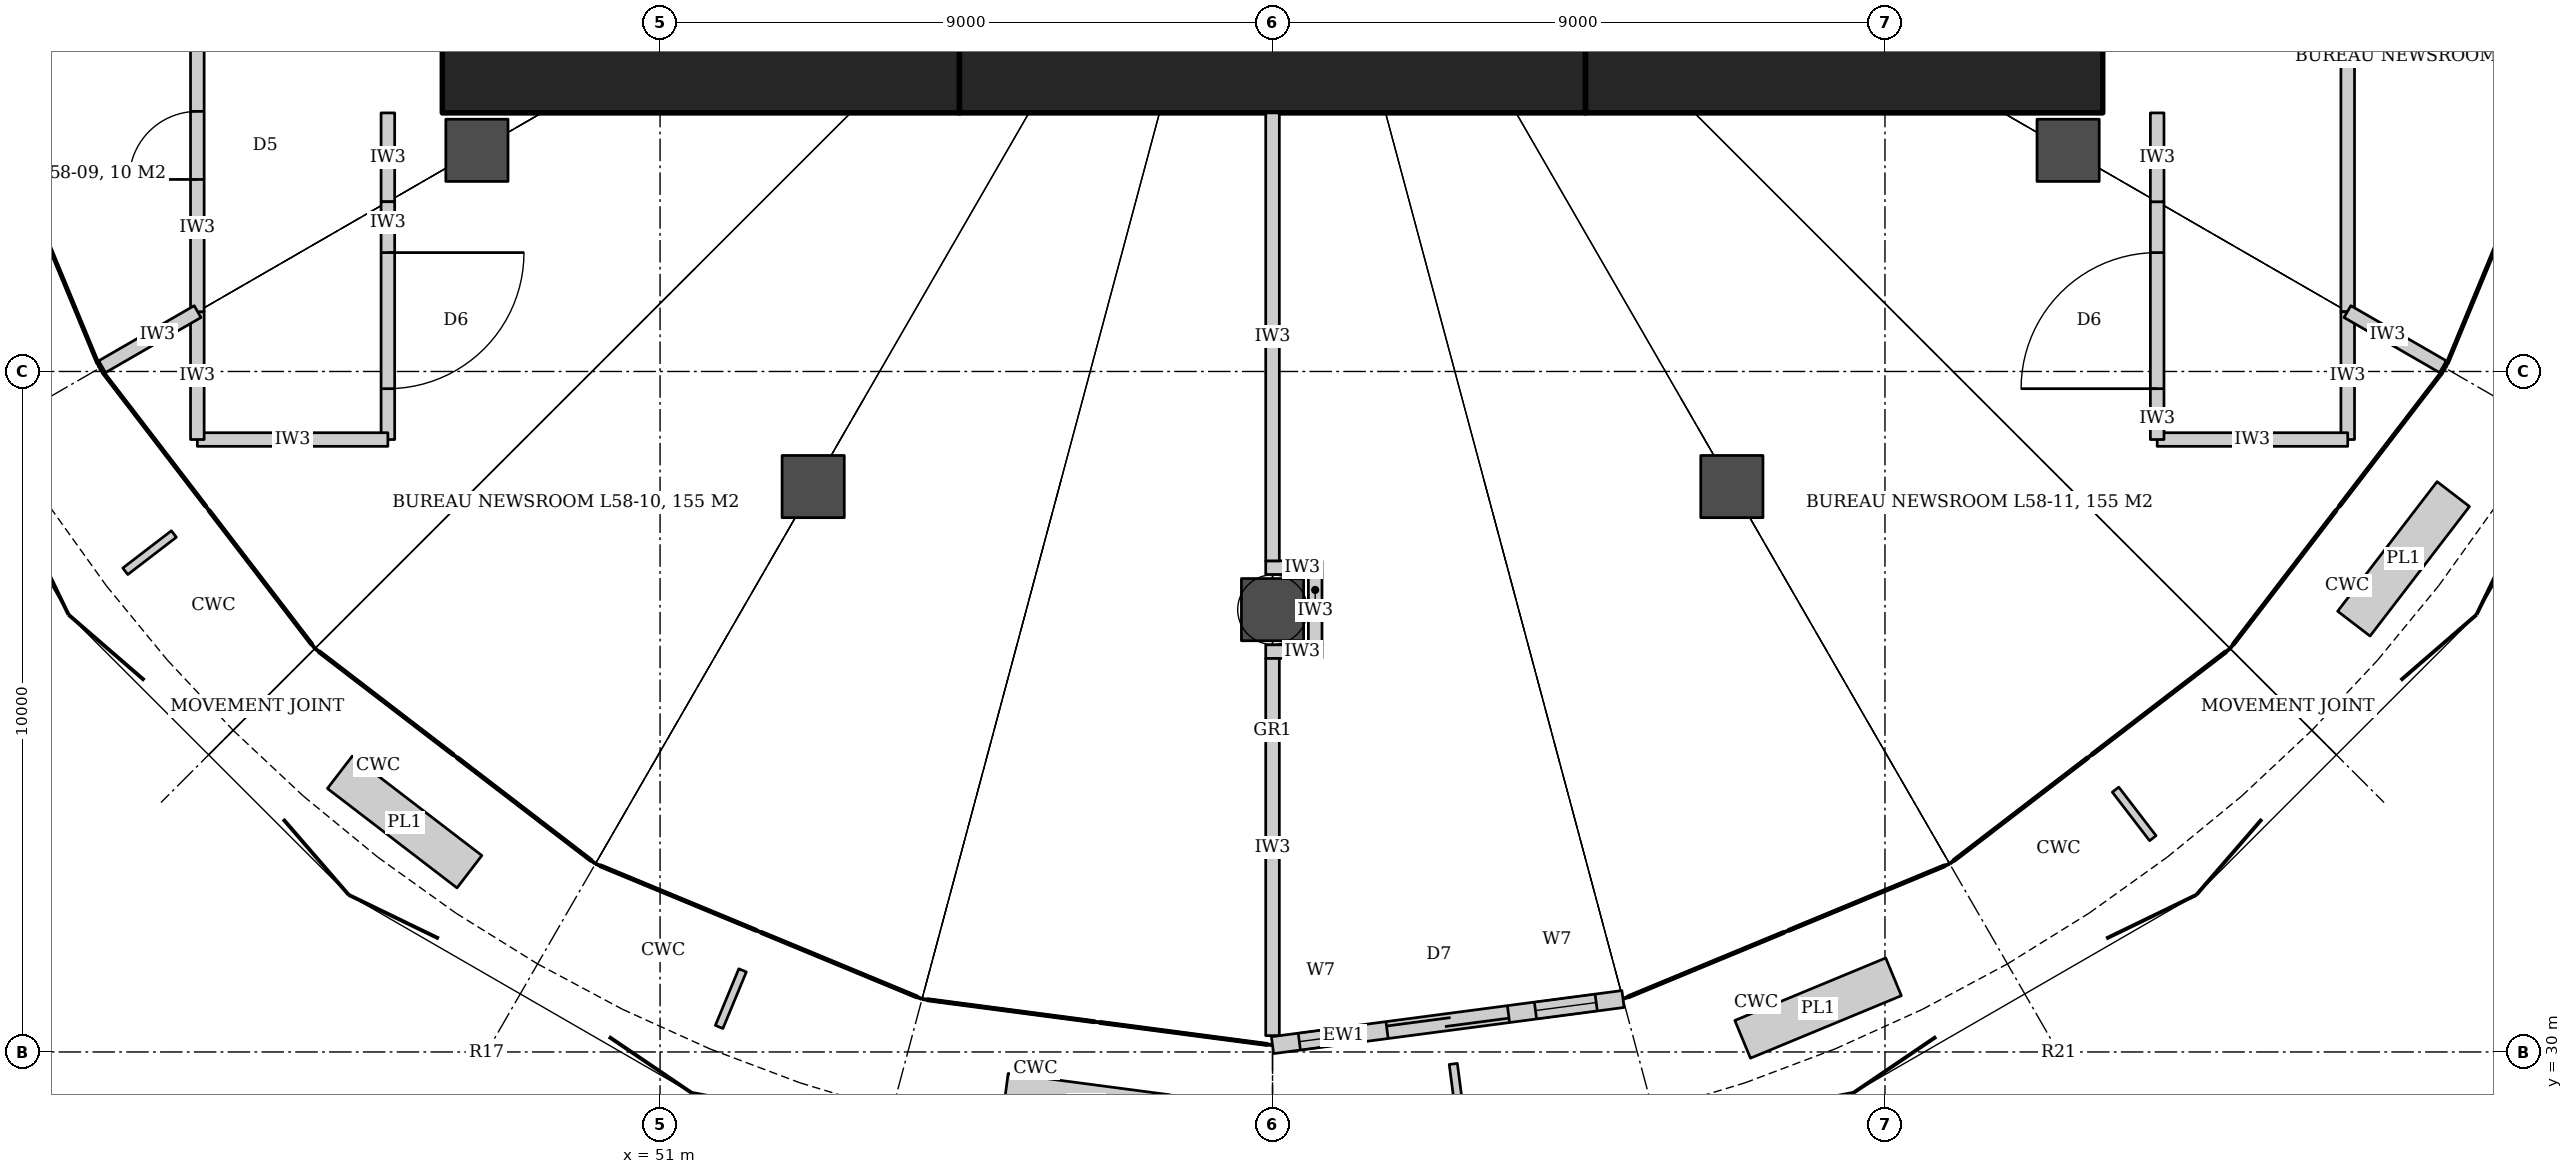
"""IFC4 building model, lengths in metres.
Left out: names, types, materials, properties, quantities, classifications, styles, units other than length and angle.
Written with IfcOpenShell. Run it as: python <this file> out.ifc"""

import sys

from ifc_helpers import new_model, si_unit, direction, frame, frame_2d, origin, origin_2d, place, context, subcontext, project, spatial, rectangle, hollow_circle, extrude, element, fill, save


model = new_model("IFC4")
c1 = context("Model", 3, precision=1e-05, world=origin(), true_north=direction((0.0, 1.0)))
c2 = subcontext(c1, "Body", "Model", "MODEL_VIEW")
j1 = project(units=[si_unit("LENGTHUNIT", "METRE"), si_unit("PLANEANGLEUNIT", "RADIAN")], contexts=[c1])
p1 = place(None, origin())
s1 = spatial("IfcSite", under=j1, at=p1, CompositionType="ELEMENT")
p2 = place(p1, origin())
s2 = spatial("IfcBuilding", under=s1, at=p2, CompositionType="ELEMENT")
p3 = place(p2, frame((0.0, 0.0, 252.8)))
s3 = spatial("IfcBuildingStorey", under=s2, at=p3, CompositionType="ELEMENT", Elevation=252.8)
p4 = place(p3, frame((47.8, 44.55, 0.0), z_axis=(0.0, 0.0, 1.0), x_axis=(1.0, 0.0, 0.0)))
e1 = element("IfcWall", 1, at=p4, inside=s3, PredefinedType="SHEAR", context=c2, shape_type="SweptSolid", body=[
    extrude(rectangle(XDim=7.6, YDim=1.5, at=frame_2d((3.8, 0.0))), origin(), (0.0, 0.0, 1.0), 4.2),
])
p5 = place(p3, frame((55.4, 44.55, 0.0), z_axis=(0.0, 0.0, 1.0), x_axis=(1.0, 0.0, 0.0)))
e2 = element("IfcWall", 2, at=p5, inside=s3, PredefinedType="SHEAR", context=c2, shape_type="SweptSolid", body=[
    extrude(rectangle(XDim=9.2, YDim=1.5, at=frame_2d((4.6, 0.0))), origin(), (0.0, 0.0, 1.0), 4.2),
])
p6 = place(p3, frame((64.6, 44.55, 0.0), z_axis=(0.0, 0.0, 1.0), x_axis=(1.0, 0.0, 0.0)))
e3 = element("IfcWall", 3, at=p6, inside=s3, PredefinedType="SHEAR", context=c2, shape_type="SweptSolid", body=[
    extrude(rectangle(XDim=7.6, YDim=1.5, at=frame_2d((3.8, 0.0))), origin(), (0.0, 0.0, 1.0), 4.2),
])
for number, where, z_axis, x_axis in (
    (4, (48.309, 43.25, 0.0), (0.0, 0.0, 1.0), (1.0, 0.0, 0.0)),
    (5, (53.25, 38.309, 0.0), (0.0, 0.0, 1.0), (1.0, 0.0, 0.0)),
    (6, (60.0, 36.5, 0.0), (0.0, 0.0, 1.0), (1.0, 0.0, 0.0)),
    (7, (66.75, 38.309, 0.0), (0.0, 0.0, 1.0), (1.0, 0.0, 0.0)),
    (8, (71.691, 43.25, 0.0), (0.0, 0.0, 1.0), (1.0, 0.0, 0.0)),
):
    element("IfcColumn", number, at=place(p3, frame(where, z_axis=z_axis, x_axis=x_axis)), inside=s3, PredefinedType="COLUMN", context=c2, shape_type="SweptSolid", body=[
        extrude(hollow_circle(Radius=0.457, WallThickness=0.045, at=origin_2d()), origin(), (0.0, 0.0, 1.0), 4.2),
    ])
p7 = place(p3, frame((75.8, 50.0, 0.0), z_axis=(0.0, 0.0, 1.0), x_axis=(0.0, -1.0, 0.0)))
e9 = element("IfcWall", 9, at=p7, inside=s3, PredefinedType="PARTITIONING", context=c2, shape_type="SweptSolid", body=[
    extrude(rectangle(XDim=9.122, YDim=0.2, at=frame_2d((4.561, 0.0))), origin(), (0.0, 0.0, 1.0), 3.02),
])
p8 = place(p7, frame((4.061, 0.0, 0.0)))
e10 = element("IfcOpeningElement", 10, at=p8, cuts=e9, PredefinedType="OPENING", context=c2, shape_type="SweptSolid", body=[
    extrude(rectangle(XDim=1.0, YDim=2.1, at=frame_2d((0.5, 1.05))), frame((0.0, 0.11, 0.0), z_axis=(0.0, -1.0, 0.0), x_axis=(1.0, 0.0, 0.0)), (0.0, 0.0, 1.0), 0.22),
])
p9 = place(p3, frame((75.8, 40.878, 0.0), z_axis=(0.0, 0.0, 1.0), x_axis=(0.0, -1.0, 0.0)))
e11 = element("IfcWall", 11, at=p9, inside=s3, PredefinedType="PARTITIONING", context=c2, shape_type="SweptSolid", body=[
    extrude(rectangle(XDim=1.878, YDim=0.2, at=frame_2d((0.939, 0.0))), origin(), (0.0, 0.0, 1.0), 3.02),
])
p10 = place(p3, frame((75.8, 39.0, 0.0), z_axis=(0.0, 0.0, 1.0), x_axis=(-1.0, 0.0, 0.0)))
e12 = element("IfcWall", 12, at=p10, inside=s3, PredefinedType="PARTITIONING", context=c2, shape_type="SweptSolid", body=[
    extrude(rectangle(XDim=2.8, YDim=0.2, at=frame_2d((1.4, 0.0))), origin(), (0.0, 0.0, 1.0), 3.04),
])
p11 = place(p3, frame((73.0, 39.0, 0.0), z_axis=(0.0, 0.0, 1.0), x_axis=(0.0, 1.0, 0.0)))
e13 = element("IfcWall", 13, at=p11, inside=s3, PredefinedType="PARTITIONING", context=c2, shape_type="SweptSolid", body=[
    extrude(rectangle(XDim=3.494, YDim=0.2, at=frame_2d((1.747, 0.0))), origin(), (0.0, 0.0, 1.0), 3.02),
])
p12 = place(p11, frame((0.747, 0.0, 0.0)))
e14 = element("IfcOpeningElement", 14, at=p12, cuts=e13, PredefinedType="OPENING", context=c2, shape_type="SweptSolid", body=[
    extrude(rectangle(XDim=2.0, YDim=2.1, at=frame_2d((1.0, 1.05))), frame((0.0, 0.11, 0.0), z_axis=(0.0, -1.0, 0.0), x_axis=(1.0, 0.0, 0.0)), (0.0, 0.0, 1.0), 0.22),
])
for number, where, z_axis, x_axis in (
    (15, (73.0, 42.494, 0.0), (0.0, 0.0, 1.0), (0.0, 1.0, 0.0)),
    (16, (47.0, 43.8, 0.0), (0.0, 0.0, 1.0), (0.0, -1.0, 0.0)),
):
    element("IfcWall", number, at=place(p3, frame(where, z_axis=z_axis, x_axis=x_axis)), inside=s3, PredefinedType="PARTITIONING", context=c2, shape_type="SweptSolid", body=[
        extrude(rectangle(XDim=1.306, YDim=0.2, at=frame_2d((0.653, 0.0))), origin(), (0.0, 0.0, 1.0), 3.02),
    ])
p13 = place(p3, frame((47.0, 42.494, 0.0), z_axis=(0.0, 0.0, 1.0), x_axis=(0.0, -1.0, 0.0)))
e17 = element("IfcWall", 17, at=p13, inside=s3, PredefinedType="PARTITIONING", context=c2, shape_type="SweptSolid", body=[
    extrude(rectangle(XDim=3.494, YDim=0.2, at=frame_2d((1.747, 0.0))), origin(), (0.0, 0.0, 1.0), 3.02),
])
p14 = place(p13, frame((0.747, 0.0, 0.0)))
e18 = element("IfcOpeningElement", 18, at=p14, cuts=e17, PredefinedType="OPENING", context=c2, shape_type="SweptSolid", body=[
    extrude(rectangle(XDim=2.0, YDim=2.1, at=frame_2d((1.0, 1.05))), frame((0.0, 0.11, 0.0), z_axis=(0.0, -1.0, 0.0), x_axis=(1.0, 0.0, 0.0)), (0.0, 0.0, 1.0), 0.22),
])
p15 = place(p3, frame((47.0, 39.0, 0.0), z_axis=(0.0, 0.0, 1.0), x_axis=(-1.0, 0.0, 0.0)))
e19 = element("IfcWall", 19, at=p15, inside=s3, PredefinedType="PARTITIONING", context=c2, shape_type="SweptSolid", body=[
    extrude(rectangle(XDim=2.8, YDim=0.2, at=frame_2d((1.4, 0.0))), origin(), (0.0, 0.0, 1.0), 3.04),
])
p16 = place(p3, frame((44.2, 39.0, 0.0), z_axis=(0.0, 0.0, 1.0), x_axis=(0.0, 1.0, 0.0)))
e20 = element("IfcWall", 20, at=p16, inside=s3, PredefinedType="PARTITIONING", context=c2, shape_type="SweptSolid", body=[
    extrude(rectangle(XDim=1.878, YDim=0.2, at=frame_2d((0.939, 0.0))), origin(), (0.0, 0.0, 1.0), 3.02),
])
p17 = place(p3, frame((44.2, 40.878, 0.0), z_axis=(0.0, 0.0, 1.0), x_axis=(0.0, 1.0, 0.0)))
e21 = element("IfcWall", 21, at=p17, inside=s3, PredefinedType="PARTITIONING", context=c2, shape_type="SweptSolid", body=[
    extrude(rectangle(XDim=4.888, YDim=0.2, at=frame_2d((2.444, 0.0))), origin(), (0.0, 0.0, 1.0), 3.02),
])
p18 = place(p17, frame((1.944, 0.0, 0.0)))
e22 = element("IfcOpeningElement", 22, at=p18, cuts=e21, PredefinedType="OPENING", context=c2, shape_type="SweptSolid", body=[
    extrude(rectangle(XDim=1.0, YDim=2.1, at=frame_2d((0.5, 1.05))), frame((0.0, 0.11, 0.0), z_axis=(0.0, -1.0, 0.0), x_axis=(1.0, 0.0, 0.0)), (0.0, 0.0, 1.0), 0.22),
])
p19 = place(p3, frame((44.204, 40.88, 0.0), z_axis=(0.0, 0.0, 1.0), x_axis=(-0.866055074793, -0.499948604784, 0.0)))
e23 = element("IfcWall", 23, at=p19, inside=s3, PredefinedType="PARTITIONING", context=c2, shape_type="SweptSolid", body=[
    extrude(rectangle(XDim=1.62, YDim=0.2, at=frame_2d((0.81, 0.0))), origin(), (0.0, 0.0, 1.0), 3.02),
])
for number, where, z_axis, x_axis in (
    (24, (59.9, 37.117, 0.0), (0.0, 0.0, 1.0), (1.0, 0.0, 0.0)),
    (25, (59.9, 35.883, 0.0), (0.0, 0.0, 1.0), (1.0, 0.0, 0.0)),
):
    element("IfcWall", number, at=place(p3, frame(where, z_axis=z_axis, x_axis=x_axis)), inside=s3, PredefinedType="PARTITIONING", context=c2, shape_type="SweptSolid", body=[
        extrude(rectangle(XDim=0.827, YDim=0.2, at=frame_2d((0.414, 0.0))), origin(), (0.0, 0.0, 1.0), 3.02),
    ])
p20 = place(p3, frame((60.627, 37.017, 0.0), z_axis=(0.0, 0.0, 1.0), x_axis=(0.0, -1.0, 0.0)))
e26 = element("IfcWall", 26, at=p20, inside=s3, PredefinedType="PARTITIONING", context=c2, shape_type="SweptSolid", body=[
    extrude(rectangle(XDim=1.034, YDim=0.2, at=frame_2d((0.517, 0.0))), origin(), (0.0, 0.0, 1.0), 3.02),
])
p21 = place(p3, frame((60.0, 43.8, 0.0), z_axis=(0.0, 0.0, 1.0), x_axis=(0.0, -1.0, 0.0)))
e27 = element("IfcWall", 27, at=p21, inside=s3, PredefinedType="PARTITIONING", context=c2, shape_type="SweptSolid", body=[
    extrude(rectangle(XDim=6.583, YDim=0.2, at=frame_2d((3.292, 0.0))), origin(), (0.0, 0.0, 1.0), 3.04),
])
p22 = place(p3, frame((60.0, 35.783, 0.0), z_axis=(0.0, 0.0, 1.0), x_axis=(0.0, -1.0, 0.0)))
e28 = element("IfcWall", 28, at=p22, inside=s3, PredefinedType="PARTITIONING", context=c2, shape_type="SweptSolid", body=[
    extrude(rectangle(XDim=5.543, YDim=0.2, at=frame_2d((2.771, 0.0))), origin(), (0.0, 0.0, 1.0), 3.02),
])
p23 = place(p3, frame((75.796, 40.88, 0.0), z_axis=(0.0, 0.0, 1.0), x_axis=(0.866055074793, -0.499948604784, 0.0)))
e29 = element("IfcWall", 29, at=p23, inside=s3, PredefinedType="PARTITIONING", context=c2, shape_type="SweptSolid", body=[
    extrude(rectangle(XDim=1.62, YDim=0.2, at=frame_2d((0.81, 0.0))), origin(), (0.0, 0.0, 1.0), 3.02),
])
p24 = place(p3, frame((60.0, 30.1, 0.0), z_axis=(0.0, 0.0, 1.0), x_axis=(0.991446935701, 0.130510435174, 0.0)))
e30 = element("IfcWall", 30, at=p24, inside=s3, PredefinedType="SOLIDWALL", context=c2, shape_type="SweptSolid", body=[
    extrude(rectangle(XDim=5.195, YDim=0.25, at=frame_2d((2.597, 0.0))), origin(), (0.0, 0.0, 1.0), 4.04),
])
p25 = place(p24, frame((1.698, 0.0, 0.0)))
e31 = element("IfcOpeningElement", 31, at=p25, cuts=e30, PredefinedType="OPENING", context=c2, shape_type="SweptSolid", body=[
    extrude(rectangle(XDim=1.8, YDim=2.4, at=frame_2d((0.9, 1.2))), frame((0.0, 0.135, 0.0), z_axis=(0.0, -1.0, 0.0), x_axis=(1.0, 0.0, 0.0)), (0.0, 0.0, 1.0), 0.27),
])
p26 = place(p24, frame((0.397, 0.0, 0.0)))
e32 = element("IfcOpeningElement", 32, at=p26, cuts=e30, PredefinedType="OPENING", context=c2, shape_type="SweptSolid", body=[
    extrude(rectangle(XDim=0.9, YDim=2.4, at=frame_2d((0.45, 1.2))), frame((0.0, 0.135, 0.0), z_axis=(0.0, -1.0, 0.0), x_axis=(1.0, 0.0, 0.0)), (0.0, 0.0, 1.0), 0.27),
])
p27 = place(p24, frame((3.897, 0.0, 0.0)))
e33 = element("IfcOpeningElement", 33, at=p27, cuts=e30, PredefinedType="OPENING", context=c2, shape_type="SweptSolid", body=[
    extrude(rectangle(XDim=0.9, YDim=2.4, at=frame_2d((0.45, 1.2))), frame((0.0, 0.135, 0.0), z_axis=(0.0, -1.0, 0.0), x_axis=(1.0, 0.0, 0.0)), (0.0, 0.0, 1.0), 0.27),
])
p28 = place(p18, origin())
e34 = element("IfcDoor", 34, at=p28, inside=s3, OperationType="SINGLE_SWING_LEFT", PredefinedType="DOOR", context=c2, shape_type="SweptSolid", body=[
    extrude(rectangle(XDim=1.0, YDim=2.1, at=frame_2d((0.5, 1.05))), frame((0.0, 0.025, 0.0), z_axis=(0.0, -1.0, 0.0), x_axis=(1.0, 0.0, 0.0)), (0.0, 0.0, 1.0), 0.05),
])
fill(e22, e34)
p29 = place(p14, origin())
e35 = element("IfcDoor", 35, at=p29, inside=s3, OperationType="DOUBLE_DOOR_DOUBLE_SWING", PredefinedType="DOOR", context=c2, shape_type="SweptSolid", body=[
    extrude(rectangle(XDim=2.0, YDim=2.1, at=frame_2d((1.0, 1.05))), frame((0.0, 0.025, 0.0), z_axis=(0.0, -1.0, 0.0), x_axis=(1.0, 0.0, 0.0)), (0.0, 0.0, 1.0), 0.05),
])
fill(e18, e35)
p30 = place(p12, origin())
e36 = element("IfcDoor", 36, at=p30, inside=s3, OperationType="DOUBLE_DOOR_DOUBLE_SWING", PredefinedType="DOOR", context=c2, shape_type="SweptSolid", body=[
    extrude(rectangle(XDim=2.0, YDim=2.1, at=frame_2d((1.0, 1.05))), frame((0.0, 0.025, 0.0), z_axis=(0.0, -1.0, 0.0), x_axis=(1.0, 0.0, 0.0)), (0.0, 0.0, 1.0), 0.05),
])
fill(e14, e36)
p31 = place(p25, origin())
e37 = element("IfcDoor", 37, at=p31, inside=s3, OperationType="DOUBLE_DOOR_SLIDING", PredefinedType="DOOR", context=c2, shape_type="SweptSolid", body=[
    extrude(rectangle(XDim=1.8, YDim=2.4, at=frame_2d((0.9, 1.2))), frame((0.0, 0.025, 0.0), z_axis=(0.0, -1.0, 0.0), x_axis=(1.0, 0.0, 0.0)), (0.0, 0.0, 1.0), 0.05),
])
fill(e31, e37)
p32 = place(p26, origin())
e38 = element("IfcWindow", 38, at=p32, inside=s3, PartitioningType="SINGLE_PANEL", PredefinedType="WINDOW", context=c2, shape_type="SweptSolid", body=[
    extrude(rectangle(XDim=0.9, YDim=2.4, at=frame_2d((0.45, 1.2))), frame((0.0, 0.03, 0.0), z_axis=(0.0, -1.0, 0.0), x_axis=(1.0, 0.0, 0.0)), (0.0, 0.0, 1.0), 0.06),
])
fill(e32, e38)
p33 = place(p27, origin())
e39 = element("IfcWindow", 39, at=p33, inside=s3, PartitioningType="SINGLE_PANEL", PredefinedType="WINDOW", context=c2, shape_type="SweptSolid", body=[
    extrude(rectangle(XDim=0.9, YDim=2.4, at=frame_2d((0.45, 1.2))), frame((0.0, 0.03, 0.0), z_axis=(0.0, -1.0, 0.0), x_axis=(1.0, 0.0, 0.0)), (0.0, 0.0, 1.0), 0.06),
])
fill(e33, e39)
save(model, sys.argv[1])
